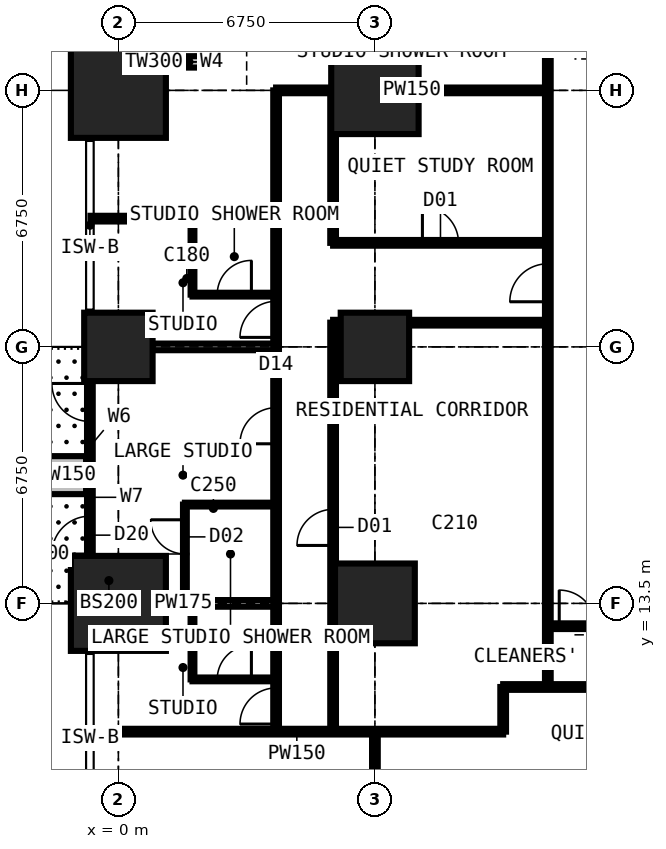
"""IFC4 building model, lengths in metres.
Left out: names, types, materials, properties, quantities, classifications, styles, units other than length and angle.
Written with IfcOpenShell. Run it as: python <this file> out.ifc"""

import sys

from ifc_helpers import new_model, si_unit, direction, frame, frame_2d, origin, origin_2d, place, context, subcontext, project, spatial, rectangle, extrude, element, fill, save


model = new_model("IFC4")
c1 = context("Model", 3, precision=1e-05, world=origin(), true_north=direction((0.0, 1.0)))
c2 = subcontext(c1, "Body", "Model", "MODEL_VIEW")
j1 = project(units=[si_unit("LENGTHUNIT", "METRE"), si_unit("PLANEANGLEUNIT", "RADIAN")], contexts=[c1])
p1 = place(None, origin())
s1 = spatial("IfcSite", under=j1, at=p1, CompositionType="ELEMENT")
p2 = place(p1, origin())
s2 = spatial("IfcBuilding", under=s1, at=p2, CompositionType="ELEMENT")
p3 = place(p2, frame((0.0, 0.0, 80.1)))
s3 = spatial("IfcBuildingStorey", under=s2, at=p3, CompositionType="ELEMENT", Elevation=80.1)
p4 = place(p3, frame((0.0, 13.5, 0.0), z_axis=(0.0, 0.0, 1.0), x_axis=(1.0, 0.0, 0.0)))
e1 = element("IfcColumn", 1, at=p4, inside=s3, PredefinedType="COLUMN", context=c2, shape_type="SweptSolid", body=[
    extrude(rectangle(XDim=2.5, YDim=2.5, at=origin_2d()), origin(), (0.0, 0.0, 1.0), 3.6),
])
p5 = place(p3, frame((0.0, 20.25, 0.0), z_axis=(0.0, 0.0, 1.0), x_axis=(1.0, 0.0, 0.0)))
e2 = element("IfcColumn", 2, at=p5, inside=s3, PredefinedType="COLUMN", context=c2, shape_type="SweptSolid", body=[
    extrude(rectangle(XDim=1.8, YDim=1.8, at=origin_2d()), origin(), (0.0, 0.0, 1.0), 3.6),
])
p6 = place(p3, frame((0.0, 27.0, 0.0), z_axis=(0.0, 0.0, 1.0), x_axis=(1.0, 0.0, 0.0)))
e3 = element("IfcColumn", 3, at=p6, inside=s3, PredefinedType="COLUMN", context=c2, shape_type="SweptSolid", body=[
    extrude(rectangle(XDim=2.5, YDim=2.5, at=origin_2d()), origin(), (0.0, 0.0, 1.0), 3.6),
])
p7 = place(p3, frame((6.75, 13.5, 0.0), z_axis=(0.0, 0.0, 1.0), x_axis=(1.0, 0.0, 0.0)))
e4 = element("IfcColumn", 4, at=p7, inside=s3, PredefinedType="COLUMN", context=c2, shape_type="SweptSolid", body=[
    extrude(rectangle(XDim=2.1, YDim=2.1, at=origin_2d()), origin(), (0.0, 0.0, 1.0), 3.6),
])
p8 = place(p3, frame((6.75, 20.25, 0.0), z_axis=(0.0, 0.0, 1.0), x_axis=(1.0, 0.0, 0.0)))
e5 = element("IfcColumn", 5, at=p8, inside=s3, PredefinedType="COLUMN", context=c2, shape_type="SweptSolid", body=[
    extrude(rectangle(XDim=1.8, YDim=1.8, at=origin_2d()), origin(), (0.0, 0.0, 1.0), 3.6),
])
p9 = place(p3, frame((6.75, 27.0, 0.0), z_axis=(0.0, 0.0, 1.0), x_axis=(1.0, 0.0, 0.0)))
e6 = element("IfcColumn", 6, at=p9, inside=s3, PredefinedType="COLUMN", context=c2, shape_type="SweptSolid", body=[
    extrude(rectangle(XDim=2.3, YDim=2.3, at=origin_2d()), origin(), (0.0, 0.0, 1.0), 3.6),
])
p10 = place(p3, frame((2.625, 31.125, 0.0), z_axis=(0.0, 0.0, 1.0), x_axis=(0.0, -1.0, 0.0)))
e7 = element("IfcWall", 7, at=p10, inside=s3, PredefinedType="SOLIDWALL", context=c2, shape_type="SweptSolid", body=[
    extrude(rectangle(XDim=3.375, YDim=0.3, at=frame_2d((1.688, 0.0))), origin(), (0.0, 0.0, 1.0), 3.375),
])
p11 = place(p10, frame((0.788, 0.0, 0.6)))
e8 = element("IfcOpeningElement", 8, at=p11, cuts=e7, PredefinedType="OPENING", context=c2, shape_type="SweptSolid", body=[
    extrude(rectangle(XDim=1.8, YDim=2.1, at=frame_2d((0.9, 1.05))), frame((0.0, 0.16, 0.0), z_axis=(0.0, -1.0, 0.0), x_axis=(1.0, 0.0, 0.0)), (0.0, 0.0, 1.0), 0.32),
])
p12 = place(p3, frame((2.625, 27.75, 0.0), z_axis=(0.0, 0.0, 1.0), x_axis=(-1.0, 0.0, 0.0)))
e9 = element("IfcWall", 9, at=p12, inside=s3, PredefinedType="SOLIDWALL", context=c2, shape_type="SweptSolid", body=[
    extrude(rectangle(XDim=3.375, YDim=0.3, at=frame_2d((1.688, 0.0))), origin(), (0.0, 0.0, 1.0), 3.375),
])
p13 = place(p12, frame((0.167, 0.0, 0.9)))
e10 = element("IfcOpeningElement", 10, at=p13, cuts=e9, PredefinedType="OPENING", context=c2, shape_type="SweptSolid", body=[
    extrude(rectangle(XDim=1.2, YDim=1.8, at=frame_2d((0.6, 0.9))), frame((0.0, 0.16, 0.0), z_axis=(0.0, -1.0, 0.0), x_axis=(1.0, 0.0, 0.0)), (0.0, 0.0, 1.0), 0.32),
])
p14 = place(p3, frame((-0.75, 13.5, 0.0), z_axis=(0.0, 0.0, 1.0), x_axis=(0.0, 1.0, 0.0)))
e11 = element("IfcWall", 11, at=p14, inside=s3, PredefinedType="SOLIDWALL", context=c2, shape_type="SweptSolid", body=[
    extrude(rectangle(XDim=6.75, YDim=0.15, at=frame_2d((3.375, 0.0))), origin(), (0.0, 0.0, 1.0), 3.375),
])
p15 = place(p14, frame((1.296, 0.0, 0.0)))
e12 = element("IfcOpeningElement", 12, at=p15, cuts=e11, PredefinedType="OPENING", context=c2, shape_type="SweptSolid", body=[
    extrude(rectangle(XDim=1.0, YDim=2.2, at=frame_2d((0.5, 1.1))), frame((0.0, 0.085, 0.0), z_axis=(0.0, -1.0, 0.0), x_axis=(1.0, 0.0, 0.0)), (0.0, 0.0, 1.0), 0.17),
])
p16 = place(p14, frame((2.342, 0.0, 0.9)))
e13 = element("IfcOpeningElement", 13, at=p16, cuts=e11, PredefinedType="OPENING", context=c2, shape_type="SweptSolid", body=[
    extrude(rectangle(XDim=0.9, YDim=1.8, at=frame_2d((0.45, 0.9))), frame((0.0, 0.085, 0.0), z_axis=(0.0, -1.0, 0.0), x_axis=(1.0, 0.0, 0.0)), (0.0, 0.0, 1.0), 0.17),
])
p17 = place(p14, frame((4.788, 0.0, 0.0)))
e14 = element("IfcOpeningElement", 14, at=p17, cuts=e11, PredefinedType="OPENING", context=c2, shape_type="SweptSolid", body=[
    extrude(rectangle(XDim=1.0, YDim=2.2, at=frame_2d((0.5, 1.1))), frame((0.0, 0.085, 0.0), z_axis=(0.0, -1.0, 0.0), x_axis=(1.0, 0.0, 0.0)), (0.0, 0.0, 1.0), 0.17),
])
p18 = place(p14, frame((3.525, 0.0, 0.9)))
e15 = element("IfcOpeningElement", 15, at=p18, cuts=e11, PredefinedType="OPENING", context=c2, shape_type="SweptSolid", body=[
    extrude(rectangle(XDim=1.2, YDim=1.8, at=frame_2d((0.6, 0.9))), frame((0.0, 0.085, 0.0), z_axis=(0.0, -1.0, 0.0), x_axis=(1.0, 0.0, 0.0)), (0.0, 0.0, 1.0), 0.17),
])
p19 = place(p3, frame((-0.85, 16.875, 0.0), z_axis=(0.0, 0.0, 1.0), x_axis=(-1.0, 0.0, 0.0)))
e16 = element("IfcWall", 16, at=p19, inside=s3, PredefinedType="USERDEFINED", context=c2, shape_type="SweptSolid", body=[
    extrude(rectangle(XDim=2.2, YDim=1.0, at=frame_2d((1.1, 0.0))), origin(), (0.0, 0.0, 1.0), 0.9),
])
p20 = place(p3, frame((-0.734, 10.125, 0.0), z_axis=(0.0, 0.0, 1.0), x_axis=(1.0, 0.0, 0.0)))
e17 = element("IfcWall", 17, at=p20, inside=s3, PredefinedType="PARTITIONING", context=c2, shape_type="SweptSolid", body=[
    extrude(rectangle(XDim=10.859, YDim=0.15, at=frame_2d((5.429, 0.0))), origin(), (0.0, 0.0, 1.0), 3.375),
])
for number, where, z_axis, x_axis in (
    (18, (-0.734, 13.5, 0.0), (0.0, 0.0, 1.0), (1.0, 0.0, 0.0)),
    (19, (-0.734, 20.25, 0.0), (0.0, 0.0, 1.0), (1.0, 0.0, 0.0)),
):
    element("IfcWall", number, at=place(p3, frame(where, z_axis=z_axis, x_axis=x_axis)), inside=s3, PredefinedType="PARTITIONING", context=c2, shape_type="SweptSolid", body=[
        extrude(rectangle(XDim=4.884, YDim=0.175, at=frame_2d((2.442, 0.0))), origin(), (0.0, 0.0, 1.0), 2.877),
    ])
p21 = place(p3, frame((-0.734, 23.625, 0.0), z_axis=(0.0, 0.0, 1.0), x_axis=(1.0, 0.0, 0.0)))
e20 = element("IfcWall", 20, at=p21, inside=s3, PredefinedType="PARTITIONING", context=c2, shape_type="SweptSolid", body=[
    extrude(rectangle(XDim=4.884, YDim=0.15, at=frame_2d((2.442, 0.0))), origin(), (0.0, 0.0, 1.0), 3.375),
])
p22 = place(p3, frame((1.75, 13.5, 0.0), z_axis=(0.0, 0.0, 1.0), x_axis=(0.0, 1.0, 0.0)))
e21 = element("IfcWall", 21, at=p22, inside=s3, PredefinedType="PARTITIONING", context=c2, shape_type="SweptSolid", body=[
    extrude(rectangle(XDim=2.6, YDim=0.1, at=frame_2d((1.3, 0.0))), origin(), (0.0, 0.0, 1.0), 3.375),
])
p23 = place(p22, frame((1.3, 0.0, 0.0)))
e22 = element("IfcOpeningElement", 22, at=p23, cuts=e21, PredefinedType="OPENING", context=c2, shape_type="SweptSolid", body=[
    extrude(rectangle(XDim=0.9, YDim=2.2, at=frame_2d((0.45, 1.1))), frame((0.0, 0.06, 0.0), z_axis=(0.0, -1.0, 0.0), x_axis=(1.0, 0.0, 0.0)), (0.0, 0.0, 1.0), 0.12),
])
p24 = place(p3, frame((1.75, 16.1, 0.0), z_axis=(0.0, 0.0, 1.0), x_axis=(1.0, 0.0, 0.0)))
e23 = element("IfcWall", 23, at=p24, inside=s3, PredefinedType="PARTITIONING", context=c2, shape_type="SweptSolid", body=[
    extrude(rectangle(XDim=2.4, YDim=0.1, at=frame_2d((1.2, 0.0))), origin(), (0.0, 0.0, 1.0), 3.375),
])
p25 = place(p3, frame((1.95, 11.5, 0.0), z_axis=(0.0, 0.0, 1.0), x_axis=(0.0, 1.0, 0.0)))
e24 = element("IfcWall", 24, at=p25, inside=s3, PredefinedType="PARTITIONING", context=c2, shape_type="SweptSolid", body=[
    extrude(rectangle(XDim=2.0, YDim=0.1, at=frame_2d((1.0, 0.0))), origin(), (0.0, 0.0, 1.0), 3.375),
])
p26 = place(p3, frame((1.95, 11.5, 0.0), z_axis=(0.0, 0.0, 1.0), x_axis=(1.0, 0.0, 0.0)))
e25 = element("IfcWall", 25, at=p26, inside=s3, PredefinedType="PARTITIONING", context=c2, shape_type="SweptSolid", body=[
    extrude(rectangle(XDim=2.2, YDim=0.1, at=frame_2d((1.1, 0.0))), origin(), (0.0, 0.0, 1.0), 3.375),
])
p27 = place(p26, frame((0.65, 0.0, 0.0)))
e26 = element("IfcOpeningElement", 26, at=p27, cuts=e25, PredefinedType="OPENING", context=c2, shape_type="SweptSolid", body=[
    extrude(rectangle(XDim=0.9, YDim=2.2, at=frame_2d((0.45, 1.1))), frame((0.0, 0.06, 0.0), z_axis=(0.0, -1.0, 0.0), x_axis=(1.0, 0.0, 0.0)), (0.0, 0.0, 1.0), 0.12),
])
p28 = place(p3, frame((1.95, 21.625, 0.0), z_axis=(0.0, 0.0, 1.0), x_axis=(0.0, 1.0, 0.0)))
e27 = element("IfcWall", 27, at=p28, inside=s3, PredefinedType="PARTITIONING", context=c2, shape_type="SweptSolid", body=[
    extrude(rectangle(XDim=2.0, YDim=0.1, at=frame_2d((1.0, 0.0))), origin(), (0.0, 0.0, 1.0), 3.375),
])
p29 = place(p3, frame((1.95, 21.625, 0.0), z_axis=(0.0, 0.0, 1.0), x_axis=(1.0, 0.0, 0.0)))
e28 = element("IfcWall", 28, at=p29, inside=s3, PredefinedType="PARTITIONING", context=c2, shape_type="SweptSolid", body=[
    extrude(rectangle(XDim=2.2, YDim=0.1, at=frame_2d((1.1, 0.0))), origin(), (0.0, 0.0, 1.0), 3.375),
])
p30 = place(p29, frame((0.65, 0.0, 0.0)))
e29 = element("IfcOpeningElement", 29, at=p30, cuts=e28, PredefinedType="OPENING", context=c2, shape_type="SweptSolid", body=[
    extrude(rectangle(XDim=0.9, YDim=2.2, at=frame_2d((0.45, 1.1))), frame((0.0, 0.06, 0.0), z_axis=(0.0, -1.0, 0.0), x_axis=(1.0, 0.0, 0.0)), (0.0, 0.0, 1.0), 0.12),
])
p31 = place(p3, frame((4.15, 10.125, 0.0), z_axis=(0.0, 0.0, 1.0), x_axis=(0.0, 1.0, 0.0)))
e30 = element("IfcWall", 30, at=p31, inside=s3, PredefinedType="PARTITIONING", context=c2, shape_type="SweptSolid", body=[
    extrude(rectangle(XDim=16.875, YDim=0.15, at=frame_2d((8.438, 0.0))), origin(), (0.0, 0.0, 1.0), 3.375),
])
p32 = place(p31, frame((7.575, 0.0, 0.0)))
e31 = element("IfcOpeningElement", 31, at=p32, cuts=e30, PredefinedType="OPENING", context=c2, shape_type="SweptSolid", body=[
    extrude(rectangle(XDim=0.95, YDim=2.2, at=frame_2d((0.475, 1.1))), frame((0.0, 0.085, 0.0), z_axis=(0.0, -1.0, 0.0), x_axis=(1.0, 0.0, 0.0)), (0.0, 0.0, 1.0), 0.17),
])
p33 = place(p31, frame((0.2, 0.0, 0.0)))
e32 = element("IfcOpeningElement", 32, at=p33, cuts=e30, PredefinedType="OPENING", context=c2, shape_type="SweptSolid", body=[
    extrude(rectangle(XDim=0.95, YDim=2.2, at=frame_2d((0.475, 1.1))), frame((0.0, 0.085, 0.0), z_axis=(0.0, -1.0, 0.0), x_axis=(1.0, 0.0, 0.0)), (0.0, 0.0, 1.0), 0.17),
])
p34 = place(p31, frame((10.375, 0.0, 0.0)))
e33 = element("IfcOpeningElement", 33, at=p34, cuts=e30, PredefinedType="OPENING", context=c2, shape_type="SweptSolid", body=[
    extrude(rectangle(XDim=0.95, YDim=2.2, at=frame_2d((0.475, 1.1))), frame((0.0, 0.085, 0.0), z_axis=(0.0, -1.0, 0.0), x_axis=(1.0, 0.0, 0.0)), (0.0, 0.0, 1.0), 0.17),
])
p35 = place(p3, frame((4.15, 27.0, 0.0), z_axis=(0.0, 0.0, 1.0), x_axis=(1.0, 0.0, 0.0)))
e34 = element("IfcWall", 34, at=p35, inside=s3, PredefinedType="PARTITIONING", context=c2, shape_type="SweptSolid", body=[
    extrude(rectangle(XDim=7.15, YDim=0.15, at=frame_2d((3.575, 0.0))), origin(), (0.0, 0.0, 1.0), 2.806),
])
p36 = place(p3, frame((5.65, 10.125, 0.0), z_axis=(0.0, 0.0, 1.0), x_axis=(0.0, 1.0, 0.0)))
e35 = element("IfcWall", 35, at=p36, inside=s3, PredefinedType="PARTITIONING", context=c2, shape_type="SweptSolid", body=[
    extrude(rectangle(XDim=10.762, YDim=0.15, at=frame_2d((5.381, 0.0))), origin(), (0.0, 0.0, 1.0), 3.375),
])
p37 = place(p36, frame((4.9, 0.0, 0.0)))
e36 = element("IfcOpeningElement", 36, at=p37, cuts=e35, PredefinedType="OPENING", context=c2, shape_type="SweptSolid", body=[
    extrude(rectangle(XDim=0.95, YDim=2.2, at=frame_2d((0.475, 1.1))), frame((0.0, 0.085, 0.0), z_axis=(0.0, -1.0, 0.0), x_axis=(1.0, 0.0, 0.0)), (0.0, 0.0, 1.0), 0.17),
])
p38 = place(p3, frame((5.65, 20.887, 0.0), z_axis=(0.0, 0.0, 1.0), x_axis=(1.0, 0.0, 0.0)))
e37 = element("IfcWall", 37, at=p38, inside=s3, PredefinedType="PARTITIONING", context=c2, shape_type="SweptSolid", body=[
    extrude(rectangle(XDim=5.65, YDim=0.15, at=frame_2d((2.825, 0.0))), origin(), (0.0, 0.0, 1.0), 3.375),
])
p39 = place(p3, frame((5.65, 22.988, 0.0), z_axis=(0.0, 0.0, 1.0), x_axis=(0.0, 1.0, 0.0)))
e38 = element("IfcWall", 38, at=p39, inside=s3, PredefinedType="PARTITIONING", context=c2, shape_type="SweptSolid", body=[
    extrude(rectangle(XDim=4.012, YDim=0.15, at=frame_2d((2.006, 0.0))), origin(), (0.0, 0.0, 1.0), 3.375),
])
p40 = place(p3, frame((5.65, 22.988, 0.0), z_axis=(0.0, 0.0, 1.0), x_axis=(1.0, 0.0, 0.0)))
e39 = element("IfcWall", 39, at=p40, inside=s3, PredefinedType="PARTITIONING", context=c2, shape_type="SweptSolid", body=[
    extrude(rectangle(XDim=5.65, YDim=0.15, at=frame_2d((2.825, 0.0))), origin(), (0.0, 0.0, 1.0), 3.375),
])
p41 = place(p40, frame((2.35, 0.0, 0.0)))
e40 = element("IfcOpeningElement", 40, at=p41, cuts=e39, PredefinedType="OPENING", context=c2, shape_type="SweptSolid", body=[
    extrude(rectangle(XDim=0.95, YDim=2.2, at=frame_2d((0.475, 1.1))), frame((0.0, 0.085, 0.0), z_axis=(0.0, -1.0, 0.0), x_axis=(1.0, 0.0, 0.0)), (0.0, 0.0, 1.0), 0.17),
])
p42 = place(p3, frame((6.75, 4.15, 0.0), z_axis=(0.0, 0.0, 1.0), x_axis=(0.0, 1.0, 0.0)))
e41 = element("IfcWall", 41, at=p42, inside=s3, PredefinedType="PARTITIONING", context=c2, shape_type="SweptSolid", body=[
    extrude(rectangle(XDim=5.975, YDim=0.15, at=frame_2d((2.988, 0.0))), origin(), (0.0, 0.0, 1.0), 2.877),
])
p43 = place(p3, frame((10.125, 10.125, 0.0), z_axis=(0.0, 0.0, 1.0), x_axis=(0.0, 1.0, 0.0)))
e42 = element("IfcWall", 42, at=p43, inside=s3, PredefinedType="PARTITIONING", context=c2, shape_type="SweptSolid", body=[
    extrude(rectangle(XDim=1.175, YDim=0.15, at=frame_2d((0.587, 0.0))), origin(), (0.0, 0.0, 1.0), 3.375),
])
p44 = place(p3, frame((10.125, 11.3, 0.0), z_axis=(0.0, 0.0, 1.0), x_axis=(1.0, 0.0, 0.0)))
e43 = element("IfcWall", 43, at=p44, inside=s3, PredefinedType="PARTITIONING", context=c2, shape_type="SweptSolid", body=[
    extrude(rectangle(XDim=20.675, YDim=0.15, at=frame_2d((10.337, 0.0))), origin(), (0.0, 0.0, 1.0), 3.375),
])
p45 = place(p44, frame((11.312, 0.0, 0.0)))
e44 = element("IfcOpeningElement", 44, at=p45, cuts=e43, PredefinedType="OPENING", context=c2, shape_type="SweptSolid", body=[
    extrude(rectangle(XDim=1.0, YDim=2.2, at=frame_2d((0.5, 1.1))), frame((0.0, 0.085, 0.0), z_axis=(0.0, -1.0, 0.0), x_axis=(1.0, 0.0, 0.0)), (0.0, 0.0, 1.0), 0.17),
])
p46 = place(p3, frame((11.3, 11.3, 0.0), z_axis=(0.0, 0.0, 1.0), x_axis=(0.0, 1.0, 0.0)))
e45 = element("IfcWall", 45, at=p46, inside=s3, PredefinedType="PARTITIONING", context=c2, shape_type="SweptSolid", body=[
    extrude(rectangle(XDim=19.3, YDim=0.15, at=frame_2d((9.65, 0.0))), origin(), (0.0, 0.0, 1.0), 3.375),
])
p47 = place(p46, frame((18.1, 0.0, 0.0)))
e46 = element("IfcOpeningElement", 46, at=p47, cuts=e45, PredefinedType="OPENING", context=c2, shape_type="SweptSolid", body=[
    extrude(rectangle(XDim=1.0, YDim=2.2, at=frame_2d((0.5, 1.1))), frame((0.0, 0.085, 0.0), z_axis=(0.0, -1.0, 0.0), x_axis=(1.0, 0.0, 0.0)), (0.0, 0.0, 1.0), 0.17),
])
p48 = place(p46, frame((10.137, 0.0, 0.0)))
e47 = element("IfcOpeningElement", 47, at=p48, cuts=e45, PredefinedType="OPENING", context=c2, shape_type="SweptSolid", body=[
    extrude(rectangle(XDim=1.0, YDim=2.2, at=frame_2d((0.5, 1.1))), frame((0.0, 0.085, 0.0), z_axis=(0.0, -1.0, 0.0), x_axis=(1.0, 0.0, 0.0)), (0.0, 0.0, 1.0), 0.17),
])
p49 = place(p3, frame((11.3, 12.9, 0.0), z_axis=(0.0, 0.0, 1.0), x_axis=(1.0, 0.0, 0.0)))
e48 = element("IfcWall", 48, at=p49, inside=s3, PredefinedType="PARTITIONING", context=c2, shape_type="SweptSolid", body=[
    extrude(rectangle(XDim=1.6, YDim=0.15, at=frame_2d((0.8, 0.0))), origin(), (0.0, 0.0, 1.0), 2.806),
])
p50 = place(p49, frame((0.3, 0.0, 0.0)))
e49 = element("IfcOpeningElement", 49, at=p50, cuts=e48, PredefinedType="OPENING", context=c2, shape_type="SweptSolid", body=[
    extrude(rectangle(XDim=0.95, YDim=2.2, at=frame_2d((0.475, 1.1))), frame((0.0, 0.085, 0.0), z_axis=(0.0, -1.0, 0.0), x_axis=(1.0, 0.0, 0.0)), (0.0, 0.0, 1.0), 0.17),
])
p51 = place(p13, origin())
e50 = element("IfcWindow", 50, at=p51, inside=s3, PartitioningType="SINGLE_PANEL", PredefinedType="WINDOW", context=c2, shape_type="SweptSolid", body=[
    extrude(rectangle(XDim=1.2, YDim=1.8, at=frame_2d((0.6, 0.9))), frame((0.0, 0.03, 0.0), z_axis=(0.0, -1.0, 0.0), x_axis=(1.0, 0.0, 0.0)), (0.0, 0.0, 1.0), 0.06),
])
fill(e10, e50)
p52 = place(p15, origin())
e51 = element("IfcDoor", 51, at=p52, inside=s3, OperationType="SINGLE_SWING_LEFT", PredefinedType="DOOR", context=c2, shape_type="SweptSolid", body=[
    extrude(rectangle(XDim=1.0, YDim=2.2, at=frame_2d((0.5, 1.1))), frame((0.0, 0.025, 0.0), z_axis=(0.0, -1.0, 0.0), x_axis=(1.0, 0.0, 0.0)), (0.0, 0.0, 1.0), 0.05),
])
fill(e12, e51)
p53 = place(p16, origin())
e52 = element("IfcWindow", 52, at=p53, inside=s3, PartitioningType="SINGLE_PANEL", PredefinedType="WINDOW", context=c2, shape_type="SweptSolid", body=[
    extrude(rectangle(XDim=0.9, YDim=1.8, at=frame_2d((0.45, 0.9))), frame((0.0, 0.03, 0.0), z_axis=(0.0, -1.0, 0.0), x_axis=(1.0, 0.0, 0.0)), (0.0, 0.0, 1.0), 0.06),
])
fill(e13, e52)
p54 = place(p17, origin())
e53 = element("IfcDoor", 53, at=p54, inside=s3, OperationType="SINGLE_SWING_RIGHT", PredefinedType="DOOR", context=c2, shape_type="SweptSolid", body=[
    extrude(rectangle(XDim=1.0, YDim=2.2, at=frame_2d((0.5, 1.1))), frame((0.0, 0.025, 0.0), z_axis=(0.0, -1.0, 0.0), x_axis=(1.0, 0.0, 0.0)), (0.0, 0.0, 1.0), 0.05),
])
fill(e14, e53)
p55 = place(p18, origin())
e54 = element("IfcWindow", 54, at=p55, inside=s3, PartitioningType="SINGLE_PANEL", PredefinedType="WINDOW", context=c2, shape_type="SweptSolid", body=[
    extrude(rectangle(XDim=1.2, YDim=1.8, at=frame_2d((0.6, 0.9))), frame((0.0, 0.03, 0.0), z_axis=(0.0, -1.0, 0.0), x_axis=(1.0, 0.0, 0.0)), (0.0, 0.0, 1.0), 0.06),
])
fill(e15, e54)
p56 = place(p50, origin())
e55 = element("IfcDoor", 55, at=p56, inside=s3, OperationType="SINGLE_SWING_LEFT", PredefinedType="DOOR", context=c2, shape_type="SweptSolid", body=[
    extrude(rectangle(XDim=0.95, YDim=2.2, at=frame_2d((0.475, 1.1))), frame((0.0, 0.025, 0.0), z_axis=(0.0, -1.0, 0.0), x_axis=(1.0, 0.0, 0.0)), (0.0, 0.0, 1.0), 0.05),
])
fill(e49, e55)
p57 = place(p32, origin())
e56 = element("IfcDoor", 56, at=p57, inside=s3, OperationType="SINGLE_SWING_LEFT", PredefinedType="DOOR", context=c2, shape_type="SweptSolid", body=[
    extrude(rectangle(XDim=0.95, YDim=2.2, at=frame_2d((0.475, 1.1))), frame((0.0, 0.025, 0.0), z_axis=(0.0, -1.0, 0.0), x_axis=(1.0, 0.0, 0.0)), (0.0, 0.0, 1.0), 0.05),
])
fill(e31, e56)
p58 = place(p23, origin())
e57 = element("IfcDoor", 57, at=p58, inside=s3, OperationType="SINGLE_SWING_RIGHT", PredefinedType="DOOR", context=c2, shape_type="SweptSolid", body=[
    extrude(rectangle(XDim=0.9, YDim=2.2, at=frame_2d((0.45, 1.1))), frame((0.0, 0.025, 0.0), z_axis=(0.0, -1.0, 0.0), x_axis=(1.0, 0.0, 0.0)), (0.0, 0.0, 1.0), 0.05),
])
fill(e22, e57)
p59 = place(p33, origin())
e58 = element("IfcDoor", 58, at=p59, inside=s3, OperationType="SINGLE_SWING_LEFT", PredefinedType="DOOR", context=c2, shape_type="SweptSolid", body=[
    extrude(rectangle(XDim=0.95, YDim=2.2, at=frame_2d((0.475, 1.1))), frame((0.0, 0.025, 0.0), z_axis=(0.0, -1.0, 0.0), x_axis=(1.0, 0.0, 0.0)), (0.0, 0.0, 1.0), 0.05),
])
fill(e32, e58)
p60 = place(p27, origin())
e59 = element("IfcDoor", 59, at=p60, inside=s3, OperationType="SINGLE_SWING_RIGHT", PredefinedType="DOOR", context=c2, shape_type="SweptSolid", body=[
    extrude(rectangle(XDim=0.9, YDim=2.2, at=frame_2d((0.45, 1.1))), frame((0.0, 0.025, 0.0), z_axis=(0.0, -1.0, 0.0), x_axis=(1.0, 0.0, 0.0)), (0.0, 0.0, 1.0), 0.05),
])
fill(e26, e59)
p61 = place(p34, origin())
e60 = element("IfcDoor", 60, at=p61, inside=s3, OperationType="SINGLE_SWING_LEFT", PredefinedType="DOOR", context=c2, shape_type="SweptSolid", body=[
    extrude(rectangle(XDim=0.95, YDim=2.2, at=frame_2d((0.475, 1.1))), frame((0.0, 0.025, 0.0), z_axis=(0.0, -1.0, 0.0), x_axis=(1.0, 0.0, 0.0)), (0.0, 0.0, 1.0), 0.05),
])
fill(e33, e60)
p62 = place(p30, origin())
e61 = element("IfcDoor", 61, at=p62, inside=s3, OperationType="SINGLE_SWING_RIGHT", PredefinedType="DOOR", context=c2, shape_type="SweptSolid", body=[
    extrude(rectangle(XDim=0.9, YDim=2.2, at=frame_2d((0.45, 1.1))), frame((0.0, 0.025, 0.0), z_axis=(0.0, -1.0, 0.0), x_axis=(1.0, 0.0, 0.0)), (0.0, 0.0, 1.0), 0.05),
])
fill(e29, e61)
p63 = place(p48, origin())
e62 = element("IfcDoor", 62, at=p63, inside=s3, OperationType="SINGLE_SWING_LEFT", PredefinedType="DOOR", context=c2, shape_type="SweptSolid", body=[
    extrude(rectangle(XDim=1.0, YDim=2.2, at=frame_2d((0.5, 1.1))), frame((0.0, 0.025, 0.0), z_axis=(0.0, -1.0, 0.0), x_axis=(1.0, 0.0, 0.0)), (0.0, 0.0, 1.0), 0.05),
])
fill(e47, e62)
p64 = place(p37, origin())
e63 = element("IfcDoor", 63, at=p64, inside=s3, OperationType="SINGLE_SWING_LEFT", PredefinedType="DOOR", context=c2, shape_type="SweptSolid", body=[
    extrude(rectangle(XDim=0.95, YDim=2.2, at=frame_2d((0.475, 1.1))), frame((0.0, 0.025, 0.0), z_axis=(0.0, -1.0, 0.0), x_axis=(1.0, 0.0, 0.0)), (0.0, 0.0, 1.0), 0.05),
])
fill(e36, e63)
p65 = place(p41, origin())
e64 = element("IfcDoor", 64, at=p65, inside=s3, OperationType="SINGLE_SWING_LEFT", PredefinedType="DOOR", context=c2, shape_type="SweptSolid", body=[
    extrude(rectangle(XDim=0.95, YDim=2.2, at=frame_2d((0.475, 1.1))), frame((0.0, 0.025, 0.0), z_axis=(0.0, -1.0, 0.0), x_axis=(1.0, 0.0, 0.0)), (0.0, 0.0, 1.0), 0.05),
])
fill(e40, e64)
save(model, sys.argv[1])
